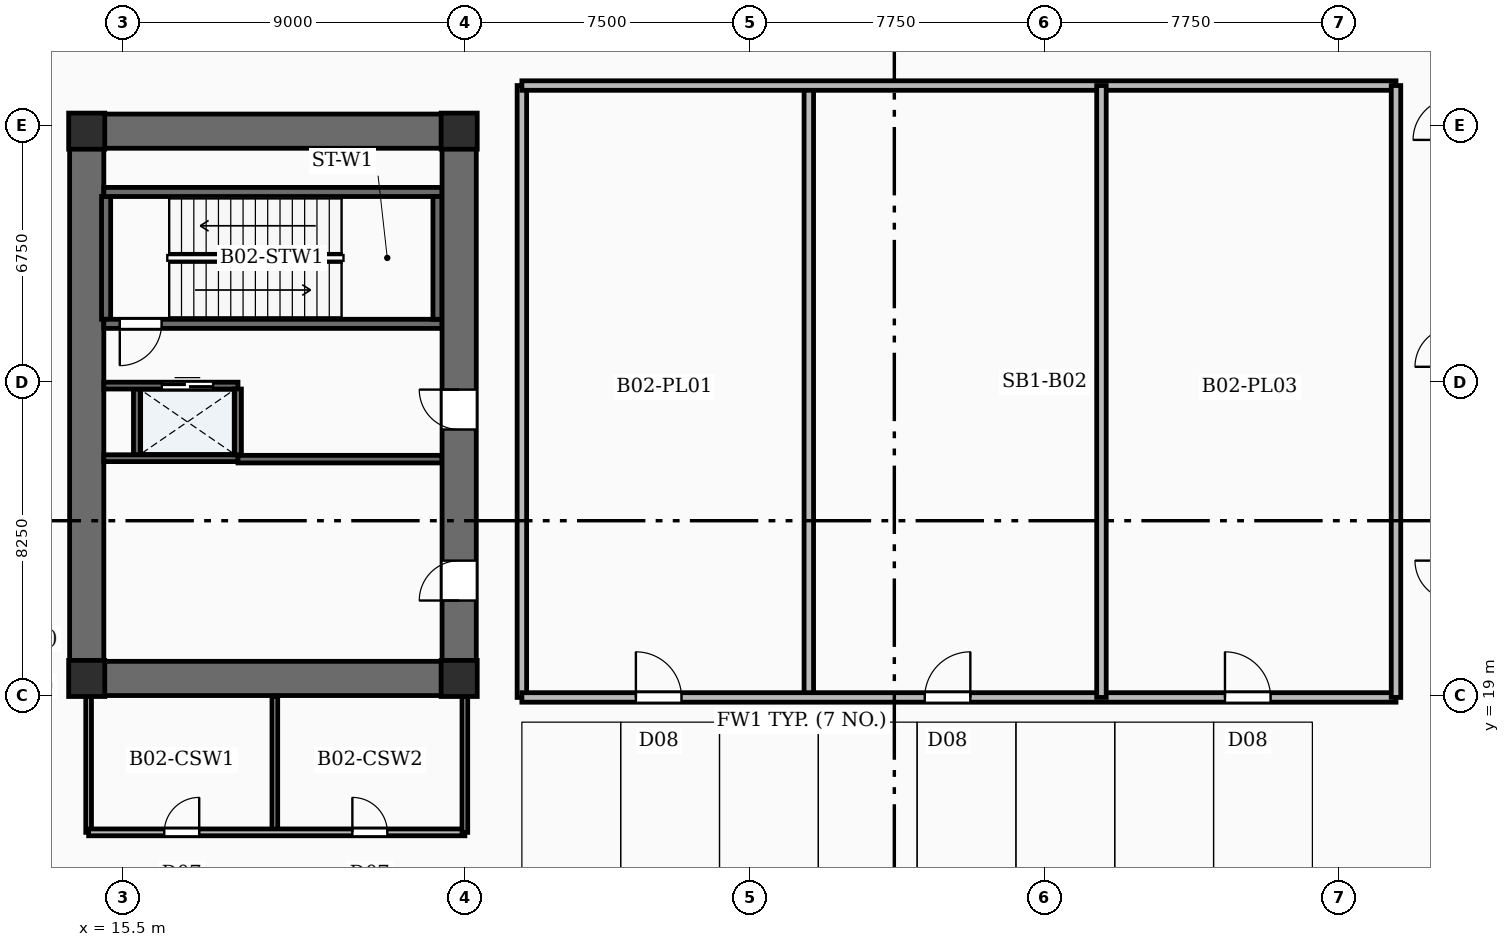
"""IFC4 building model, lengths in metres.
Left out: names, types, materials, properties, quantities, classifications, styles, units other than length and angle.
Written with IfcOpenShell. Run it as: python <this file> out.ifc"""

import sys

from ifc_helpers import new_model, si_unit, direction, frame, frame_2d, origin, origin_2d, place, context, subcontext, project, spatial, rectangle, extrude, element, fill, save


model = new_model("IFC4")
c1 = context("Model", 3, precision=1e-05, world=origin(), true_north=direction((0.0, 1.0)))
c2 = subcontext(c1, "Body", "Model", "MODEL_VIEW")
j1 = project(units=[si_unit("LENGTHUNIT", "METRE"), si_unit("PLANEANGLEUNIT", "RADIAN")], contexts=[c1])
p1 = place(None, origin())
s1 = spatial("IfcSite", under=j1, at=p1, CompositionType="ELEMENT")
p2 = place(p1, origin())
s2 = spatial("IfcBuilding", under=s1, at=p2, CompositionType="ELEMENT")
p3 = place(p2, frame((0.0, 0.0, -10.0)))
s3 = spatial("IfcBuildingStorey", under=s2, at=p3, CompositionType="ELEMENT", Elevation=-10.0)
p4 = place(p3, frame((14.55, 19.0, -0.85), z_axis=(0.0, 0.0, 1.0), x_axis=(0.0, 1.0, 0.0)))
e1 = element("IfcWall", 1, at=p4, inside=s3, PredefinedType="SHEAR", context=c2, shape_type="SweptSolid", body=[
    extrude(rectangle(XDim=15.3, YDim=0.9, at=frame_2d((7.65, 0.0))), origin(), (0.0, 0.0, 1.0), 5.54),
])
p5 = place(p3, frame((24.35, 19.0, -0.85), z_axis=(0.0, 0.0, 1.0), x_axis=(0.0, 1.0, 0.0)))
e2 = element("IfcWall", 2, at=p5, inside=s3, PredefinedType="SHEAR", context=c2, shape_type="SweptSolid", body=[
    extrude(rectangle(XDim=15.3, YDim=0.9, at=frame_2d((7.65, 0.0))), origin(), (0.0, 0.0, 1.0), 5.54),
])
p6 = place(p5, frame((2.5, 0.0, 0.85)))
e3 = element("IfcOpeningElement", 3, at=p6, cuts=e2, PredefinedType="OPENING", context=c2, shape_type="SweptSolid", body=[
    extrude(rectangle(XDim=1.05, YDim=2.15, at=frame_2d((0.525, 1.075))), frame((0.0, 0.46, 0.0), z_axis=(0.0, -1.0, 0.0), x_axis=(1.0, 0.0, 0.0)), (0.0, 0.0, 1.0), 0.92),
])
p7 = place(p5, frame((7.0, 0.0, 0.85)))
e4 = element("IfcOpeningElement", 4, at=p7, cuts=e2, PredefinedType="OPENING", context=c2, shape_type="SweptSolid", body=[
    extrude(rectangle(XDim=1.05, YDim=2.15, at=frame_2d((0.525, 1.075))), frame((0.0, 0.46, 0.0), z_axis=(0.0, -1.0, 0.0), x_axis=(1.0, 0.0, 0.0)), (0.0, 0.0, 1.0), 0.92),
])
for number, where, z_axis, x_axis in (
    (5, (15.0, 19.45, -0.85), (0.0, 0.0, 1.0), (1.0, 0.0, 0.0)),
    (6, (15.0, 33.85, -0.85), (0.0, 0.0, 1.0), (1.0, 0.0, 0.0)),
):
    element("IfcWall", number, at=place(p3, frame(where, z_axis=z_axis, x_axis=x_axis)), inside=s3, PredefinedType="SHEAR", context=c2, shape_type="SweptSolid", body=[
        extrude(rectangle(XDim=8.9, YDim=0.9, at=frame_2d((4.45, 0.0))), origin(), (0.0, 0.0, 1.0), 5.54),
    ])
for number, where, z_axis, x_axis in (
    (7, (14.55, 19.45, -0.85), (0.0, 0.0, 1.0), (1.0, 0.0, 0.0)),
    (8, (24.35, 19.45, -0.85), (0.0, 0.0, 1.0), (1.0, 0.0, 0.0)),
    (9, (14.55, 33.85, -0.85), (0.0, 0.0, 1.0), (1.0, 0.0, 0.0)),
    (10, (24.35, 33.85, -0.85), (0.0, 0.0, 1.0), (1.0, 0.0, 0.0)),
):
    element("IfcColumn", number, at=place(p3, frame(where, z_axis=z_axis, x_axis=x_axis)), inside=s3, PredefinedType="COLUMN", context=c2, shape_type="SweptSolid", body=[
        extrude(rectangle(XDim=0.95, YDim=0.95, at=origin_2d()), origin(), (0.0, 0.0, 1.0), 5.54),
    ])
p8 = place(p3, frame((23.9, 28.78, 0.0), z_axis=(0.0, 0.0, 1.0), x_axis=(-1.0, 0.0, 0.0)))
e11 = element("IfcWall", 11, at=p8, inside=s3, PredefinedType="SOLIDWALL", context=c2, shape_type="SweptSolid", body=[
    extrude(rectangle(XDim=8.9, YDim=0.24, at=frame_2d((4.45, 0.0))), origin(), (0.0, 0.0, 1.0), 4.69),
])
p9 = place(p8, frame((7.38, 0.0, 0.0)))
e12 = element("IfcOpeningElement", 12, at=p9, cuts=e11, PredefinedType="OPENING", context=c2, shape_type="SweptSolid", body=[
    extrude(rectangle(XDim=1.1, YDim=2.15, at=frame_2d((0.55, 1.075))), frame((0.0, 0.13, 0.0), z_axis=(0.0, -1.0, 0.0), x_axis=(1.0, 0.0, 0.0)), (0.0, 0.0, 1.0), 0.26),
])
p10 = place(p3, frame((15.0, 32.25, 0.0), z_axis=(0.0, 0.0, 1.0), x_axis=(1.0, 0.0, 0.0)))
e13 = element("IfcWall", 13, at=p10, inside=s3, PredefinedType="SOLIDWALL", context=c2, shape_type="SweptSolid", body=[
    extrude(rectangle(XDim=8.9, YDim=0.24, at=frame_2d((4.45, 0.0))), origin(), (0.0, 0.0, 1.0), 4.69),
])
for number, where, z_axis, x_axis in (
    (14, (15.06, 28.9, 0.0), (0.0, 0.0, 1.0), (0.0, 1.0, 0.0)),
    (15, (23.78, 28.9, 0.0), (0.0, 0.0, 1.0), (0.0, 1.0, 0.0)),
):
    element("IfcWall", number, at=place(p3, frame(where, z_axis=z_axis, x_axis=x_axis)), inside=s3, PredefinedType="SOLIDWALL", context=c2, shape_type="SweptSolid", body=[
        extrude(rectangle(XDim=3.23, YDim=0.24, at=frame_2d((1.615, 0.0))), origin(), (0.0, 0.0, 1.0), 4.69),
    ])
p11 = place(p3, frame((15.0, 27.155, 0.0), z_axis=(0.0, 0.0, 1.0), x_axis=(1.0, 0.0, 0.0)))
e16 = element("IfcWall", 16, at=p11, inside=s3, PredefinedType="SOLIDWALL", context=c2, shape_type="SweptSolid", body=[
    extrude(rectangle(XDim=3.53, YDim=0.18, at=frame_2d((1.765, 0.0))), origin(), (0.0, 0.0, 1.0), 4.69),
])
p12 = place(p11, frame((1.525, 0.0, 0.0)))
e17 = element("IfcOpeningElement", 17, at=p12, cuts=e16, PredefinedType="OPENING", context=c2, shape_type="SweptSolid", body=[
    extrude(rectangle(XDim=1.35, YDim=2.3, at=frame_2d((0.675, 1.15))), frame((0.0, 0.1, 0.0), z_axis=(0.0, -1.0, 0.0), x_axis=(1.0, 0.0, 0.0)), (0.0, 0.0, 1.0), 0.2),
])
p13 = place(p3, frame((15.0, 25.245, 0.0), z_axis=(0.0, 0.0, 1.0), x_axis=(1.0, 0.0, 0.0)))
e18 = element("IfcWall", 18, at=p13, inside=s3, PredefinedType="SOLIDWALL", context=c2, shape_type="SweptSolid", body=[
    extrude(rectangle(XDim=3.53, YDim=0.18, at=frame_2d((1.765, 0.0))), origin(), (0.0, 0.0, 1.0), 4.69),
])
for number, where, z_axis, x_axis in (
    (19, (15.87, 25.335, 0.0), (0.0, 0.0, 1.0), (0.0, 1.0, 0.0)),
    (20, (18.53, 25.335, 0.0), (0.0, 0.0, 1.0), (0.0, 1.0, 0.0)),
):
    element("IfcWall", number, at=place(p3, frame(where, z_axis=z_axis, x_axis=x_axis)), inside=s3, PredefinedType="SOLIDWALL", context=c2, shape_type="SweptSolid", body=[
        extrude(rectangle(XDim=1.73, YDim=0.18, at=frame_2d((0.865, 0.0))), origin(), (0.0, 0.0, 1.0), 4.69),
    ])
p14 = place(p3, frame((18.53, 25.22, 0.0), z_axis=(0.0, 0.0, 1.0), x_axis=(1.0, 0.0, 0.0)))
e21 = element("IfcWall", 21, at=p14, inside=s3, PredefinedType="SOLIDWALL", context=c2, shape_type="SweptSolid", body=[
    extrude(rectangle(XDim=5.37, YDim=0.2, at=frame_2d((2.685, 0.0))), origin(), (0.0, 0.0, 1.0), 3.75),
])
p15 = place(p3, frame((19.5, 15.4, 0.0), z_axis=(0.0, 0.0, 1.0), x_axis=(0.0, 1.0, 0.0)))
e22 = element("IfcWall", 22, at=p15, inside=s3, PredefinedType="PARTITIONING", context=c2, shape_type="SweptSolid", body=[
    extrude(rectangle(XDim=3.58, YDim=0.15, at=frame_2d((1.79, 0.0))), origin(), (0.0, 0.0, 1.0), 3.75),
])
p16 = place(p3, frame((14.6, 15.4, 0.0), z_axis=(0.0, 0.0, 1.0), x_axis=(1.0, 0.0, 0.0)))
e23 = element("IfcWall", 23, at=p16, inside=s3, PredefinedType="PARTITIONING", context=c2, shape_type="SweptSolid", body=[
    extrude(rectangle(XDim=9.9, YDim=0.18, at=frame_2d((4.95, 0.0))), origin(), (0.0, 0.0, 1.0), 3.75),
])
p17 = place(p16, frame((1.99, 0.0, 0.0)))
e24 = element("IfcOpeningElement", 24, at=p17, cuts=e23, PredefinedType="OPENING", context=c2, shape_type="SweptSolid", body=[
    extrude(rectangle(XDim=0.92, YDim=2.1, at=frame_2d((0.46, 1.05))), frame((0.0, 0.1, 0.0), z_axis=(0.0, -1.0, 0.0), x_axis=(1.0, 0.0, 0.0)), (0.0, 0.0, 1.0), 0.2),
])
p18 = place(p16, frame((6.94, 0.0, 0.0)))
e25 = element("IfcOpeningElement", 25, at=p18, cuts=e23, PredefinedType="OPENING", context=c2, shape_type="SweptSolid", body=[
    extrude(rectangle(XDim=0.92, YDim=2.1, at=frame_2d((0.46, 1.05))), frame((0.0, 0.1, 0.0), z_axis=(0.0, -1.0, 0.0), x_axis=(1.0, 0.0, 0.0)), (0.0, 0.0, 1.0), 0.2),
])
for number, where, z_axis, x_axis in (
    (26, (14.6, 15.4, 0.0), (0.0, 0.0, 1.0), (0.0, 1.0, 0.0)),
    (27, (24.5, 15.4, 0.0), (0.0, 0.0, 1.0), (0.0, 1.0, 0.0)),
):
    element("IfcWall", number, at=place(p3, frame(where, z_axis=z_axis, x_axis=x_axis)), inside=s3, PredefinedType="PARTITIONING", context=c2, shape_type="SweptSolid", body=[
        extrude(rectangle(XDim=3.58, YDim=0.15, at=frame_2d((1.79, 0.0))), origin(), (0.0, 0.0, 1.0), 3.75),
    ])
p19 = place(p3, frame((26.0, 18.95, 0.0), z_axis=(0.0, 0.0, 1.0), x_axis=(1.0, 0.0, 0.0)))
e28 = element("IfcWall", 28, at=p19, inside=s3, PredefinedType="SOLIDWALL", context=c2, shape_type="SweptSolid", body=[
    extrude(rectangle(XDim=23.0, YDim=0.25, at=frame_2d((11.5, 0.0))), origin(), (0.0, 0.0, 1.0), 3.75),
])
p20 = place(p19, frame((3.0, 0.0, 0.0)))
e29 = element("IfcOpeningElement", 29, at=p20, cuts=e28, PredefinedType="OPENING", context=c2, shape_type="SweptSolid", body=[
    extrude(rectangle(XDim=1.2, YDim=2.2, at=frame_2d((0.6, 1.1))), frame((0.0, 0.135, 0.0), z_axis=(0.0, -1.0, 0.0), x_axis=(1.0, 0.0, 0.0)), (0.0, 0.0, 1.0), 0.27),
])
p21 = place(p19, frame((10.6, 0.0, 0.0)))
e30 = element("IfcOpeningElement", 30, at=p21, cuts=e28, PredefinedType="OPENING", context=c2, shape_type="SweptSolid", body=[
    extrude(rectangle(XDim=1.2, YDim=2.2, at=frame_2d((0.6, 1.1))), frame((0.0, 0.135, 0.0), z_axis=(0.0, -1.0, 0.0), x_axis=(1.0, 0.0, 0.0)), (0.0, 0.0, 1.0), 0.27),
])
p22 = place(p19, frame((18.5, 0.0, 0.0)))
e31 = element("IfcOpeningElement", 31, at=p22, cuts=e28, PredefinedType="OPENING", context=c2, shape_type="SweptSolid", body=[
    extrude(rectangle(XDim=1.2, YDim=2.2, at=frame_2d((0.6, 1.1))), frame((0.0, 0.135, 0.0), z_axis=(0.0, -1.0, 0.0), x_axis=(1.0, 0.0, 0.0)), (0.0, 0.0, 1.0), 0.27),
])
p23 = place(p3, frame((26.0, 35.05, 0.0), z_axis=(0.0, 0.0, 1.0), x_axis=(1.0, 0.0, 0.0)))
e32 = element("IfcWall", 32, at=p23, inside=s3, PredefinedType="SOLIDWALL", context=c2, shape_type="SweptSolid", body=[
    extrude(rectangle(XDim=23.0, YDim=0.25, at=frame_2d((11.5, 0.0))), origin(), (0.0, 0.0, 1.0), 3.75),
])
for number, where, z_axis, x_axis in (
    (33, (26.0, 18.95, 0.0), (0.0, 0.0, 1.0), (0.0, 1.0, 0.0)),
    (34, (49.0, 18.95, 0.0), (0.0, 0.0, 1.0), (0.0, 1.0, 0.0)),
    (35, (33.55, 18.95, 0.0), (0.0, 0.0, 1.0), (0.0, 1.0, 0.0)),
    (36, (41.25, 18.95, 0.0), (0.0, 0.0, 1.0), (0.0, 1.0, 0.0)),
):
    element("IfcWall", number, at=place(p3, frame(where, z_axis=z_axis, x_axis=x_axis)), inside=s3, PredefinedType="SOLIDWALL", context=c2, shape_type="SweptSolid", body=[
        extrude(rectangle(XDim=16.1, YDim=0.25, at=frame_2d((8.05, 0.0))), origin(), (0.0, 0.0, 1.0), 3.75),
    ])
p24 = place(p6, origin())
e37 = element("IfcDoor", 37, at=p24, inside=s3, OperationType="SINGLE_SWING_LEFT", PredefinedType="DOOR", context=c2, shape_type="SweptSolid", body=[
    extrude(rectangle(XDim=1.05, YDim=2.15, at=frame_2d((0.525, 1.075))), frame((0.0, 0.025, 0.0), z_axis=(0.0, -1.0, 0.0), x_axis=(1.0, 0.0, 0.0)), (0.0, 0.0, 1.0), 0.05),
])
fill(e3, e37)
p25 = place(p7, origin())
e38 = element("IfcDoor", 38, at=p25, inside=s3, OperationType="SINGLE_SWING_RIGHT", PredefinedType="DOOR", context=c2, shape_type="SweptSolid", body=[
    extrude(rectangle(XDim=1.05, YDim=2.15, at=frame_2d((0.525, 1.075))), frame((0.0, 0.025, 0.0), z_axis=(0.0, -1.0, 0.0), x_axis=(1.0, 0.0, 0.0)), (0.0, 0.0, 1.0), 0.05),
])
fill(e4, e38)
p26 = place(p9, origin())
e39 = element("IfcDoor", 39, at=p26, inside=s3, OperationType="SINGLE_SWING_RIGHT", PredefinedType="DOOR", context=c2, shape_type="SweptSolid", body=[
    extrude(rectangle(XDim=1.1, YDim=2.15, at=frame_2d((0.55, 1.075))), frame((0.0, 0.025, 0.0), z_axis=(0.0, -1.0, 0.0), x_axis=(1.0, 0.0, 0.0)), (0.0, 0.0, 1.0), 0.05),
])
fill(e12, e39)
p27 = place(p12, origin())
e40 = element("IfcDoor", 40, at=p27, inside=s3, OperationType="DOUBLE_DOOR_SLIDING", PredefinedType="DOOR", context=c2, shape_type="SweptSolid", body=[
    extrude(rectangle(XDim=1.35, YDim=2.3, at=frame_2d((0.675, 1.15))), frame((0.0, 0.025, 0.0), z_axis=(0.0, -1.0, 0.0), x_axis=(1.0, 0.0, 0.0)), (0.0, 0.0, 1.0), 0.05),
])
fill(e17, e40)
p28 = place(p17, origin())
e41 = element("IfcDoor", 41, at=p28, inside=s3, OperationType="SINGLE_SWING_RIGHT", PredefinedType="DOOR", context=c2, shape_type="SweptSolid", body=[
    extrude(rectangle(XDim=0.92, YDim=2.1, at=frame_2d((0.46, 1.05))), frame((0.0, 0.025, 0.0), z_axis=(0.0, -1.0, 0.0), x_axis=(1.0, 0.0, 0.0)), (0.0, 0.0, 1.0), 0.05),
])
fill(e24, e41)
p29 = place(p18, origin())
e42 = element("IfcDoor", 42, at=p29, inside=s3, OperationType="SINGLE_SWING_LEFT", PredefinedType="DOOR", context=c2, shape_type="SweptSolid", body=[
    extrude(rectangle(XDim=0.92, YDim=2.1, at=frame_2d((0.46, 1.05))), frame((0.0, 0.025, 0.0), z_axis=(0.0, -1.0, 0.0), x_axis=(1.0, 0.0, 0.0)), (0.0, 0.0, 1.0), 0.05),
])
fill(e25, e42)
p30 = place(p20, origin())
e43 = element("IfcDoor", 43, at=p30, inside=s3, OperationType="SINGLE_SWING_LEFT", PredefinedType="DOOR", context=c2, shape_type="SweptSolid", body=[
    extrude(rectangle(XDim=1.2, YDim=2.2, at=frame_2d((0.6, 1.1))), frame((0.0, 0.025, 0.0), z_axis=(0.0, -1.0, 0.0), x_axis=(1.0, 0.0, 0.0)), (0.0, 0.0, 1.0), 0.05),
])
fill(e29, e43)
p31 = place(p21, origin())
e44 = element("IfcDoor", 44, at=p31, inside=s3, OperationType="SINGLE_SWING_RIGHT", PredefinedType="DOOR", context=c2, shape_type="SweptSolid", body=[
    extrude(rectangle(XDim=1.2, YDim=2.2, at=frame_2d((0.6, 1.1))), frame((0.0, 0.025, 0.0), z_axis=(0.0, -1.0, 0.0), x_axis=(1.0, 0.0, 0.0)), (0.0, 0.0, 1.0), 0.05),
])
fill(e30, e44)
p32 = place(p22, origin())
e45 = element("IfcDoor", 45, at=p32, inside=s3, OperationType="SINGLE_SWING_LEFT", PredefinedType="DOOR", context=c2, shape_type="SweptSolid", body=[
    extrude(rectangle(XDim=1.2, YDim=2.2, at=frame_2d((0.6, 1.1))), frame((0.0, 0.025, 0.0), z_axis=(0.0, -1.0, 0.0), x_axis=(1.0, 0.0, 0.0)), (0.0, 0.0, 1.0), 0.05),
])
fill(e31, e45)
save(model, sys.argv[1])
